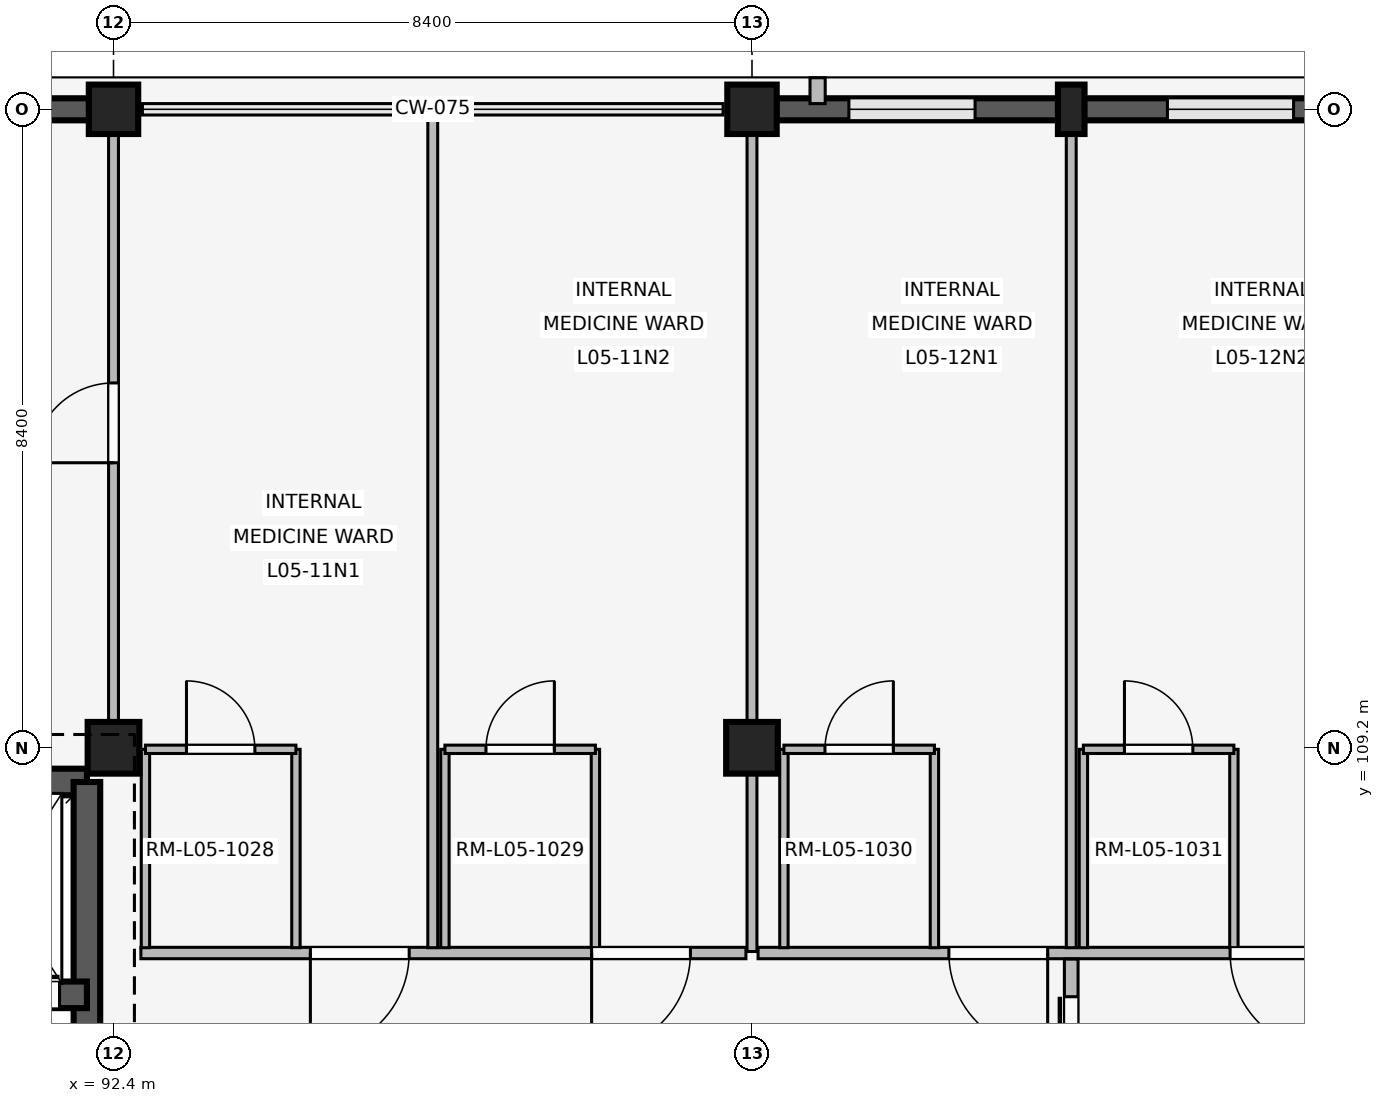
"""IFC4 building model, lengths in metres.
Left out: names, types, materials, properties, quantities, classifications, styles, units other than length and angle.
Written with IfcOpenShell. Run it as: python <this file> out.ifc"""

import sys

from ifc_helpers import new_model, si_unit, direction, frame, frame_2d, origin, origin_2d, place, context, subcontext, project, spatial, rectangle, extrude, element, fill, save


model = new_model("IFC4")
c1 = context("Model", 3, precision=1e-05, world=origin(), true_north=direction((0.0, 1.0)))
c2 = subcontext(c1, "Body", "Model", "MODEL_VIEW")
j1 = project(units=[si_unit("LENGTHUNIT", "METRE"), si_unit("PLANEANGLEUNIT", "RADIAN")], contexts=[c1])
p1 = place(None, origin())
s1 = spatial("IfcSite", under=j1, at=p1, CompositionType="ELEMENT")
p2 = place(p1, origin())
s2 = spatial("IfcBuilding", under=s1, at=p2, CompositionType="ELEMENT")
p3 = place(p2, frame((0.0, 0.0, 20.4)))
s3 = spatial("IfcBuildingStorey", under=s2, at=p3, CompositionType="ELEMENT", Elevation=20.4)
p4 = place(p3, frame((92.4, 109.2, 0.0), z_axis=(0.0, 0.0, 1.0), x_axis=(1.0, 0.0, 0.0)))
e1 = element("IfcColumn", 1, at=p4, inside=s3, PredefinedType="COLUMN", context=c2, shape_type="SweptSolid", body=[
    extrude(rectangle(XDim=0.68, YDim=0.68, at=origin_2d()), origin(), (0.0, 0.0, 1.0), 4.2),
])
p5 = place(p3, frame((92.4, 117.6, 0.0), z_axis=(0.0, 0.0, 1.0), x_axis=(1.0, 0.0, 0.0)))
e2 = element("IfcColumn", 2, at=p5, inside=s3, PredefinedType="COLUMN", context=c2, shape_type="SweptSolid", body=[
    extrude(rectangle(XDim=0.65, YDim=0.65, at=origin_2d()), origin(), (0.0, 0.0, 1.0), 4.2),
])
p6 = place(p3, frame((100.8, 109.2, 0.0), z_axis=(0.0, 0.0, 1.0), x_axis=(1.0, 0.0, 0.0)))
e3 = element("IfcColumn", 3, at=p6, inside=s3, PredefinedType="COLUMN", context=c2, shape_type="SweptSolid", body=[
    extrude(rectangle(XDim=0.68, YDim=0.68, at=origin_2d()), origin(), (0.0, 0.0, 1.0), 4.2),
])
p7 = place(p3, frame((100.8, 117.6, 0.0), z_axis=(0.0, 0.0, 1.0), x_axis=(1.0, 0.0, 0.0)))
e4 = element("IfcColumn", 4, at=p7, inside=s3, PredefinedType="COLUMN", context=c2, shape_type="SweptSolid", body=[
    extrude(rectangle(XDim=0.65, YDim=0.65, at=origin_2d()), origin(), (0.0, 0.0, 1.0), 4.2),
])
p8 = place(p3, frame((105.0, 117.6, 0.0), z_axis=(0.0, 0.0, 1.0), x_axis=(1.0, 0.0, 0.0)))
e5 = element("IfcColumn", 5, at=p8, inside=s3, PredefinedType="PILASTER", context=c2, shape_type="SweptSolid", body=[
    extrude(rectangle(XDim=0.35, YDim=0.65, at=origin_2d()), origin(), (0.0, 0.0, 1.0), 4.2),
])
p9 = place(p3, frame((84.32, 117.6, 0.0), z_axis=(0.0, 0.0, 1.0), x_axis=(1.0, 0.0, 0.0)))
e6 = element("IfcWall", 6, at=p9, inside=s3, PredefinedType="SOLIDWALL", context=c2, shape_type="SweptSolid", body=[
    extrude(rectangle(XDim=7.76, YDim=0.29, at=frame_2d((3.88, 0.0))), origin(), (0.0, 0.0, 1.0), 3.34),
])
p10 = place(p9, frame((1.045, 0.0, 0.85)))
e7 = element("IfcOpeningElement", 7, at=p10, cuts=e6, PredefinedType="OPENING", context=c2, shape_type="SweptSolid", body=[
    extrude(rectangle(XDim=1.48, YDim=1.6, at=frame_2d((0.74, 0.8))), frame((0.0, 0.155, 0.0), z_axis=(0.0, -1.0, 0.0), x_axis=(1.0, 0.0, 0.0)), (0.0, 0.0, 1.0), 0.31),
])
p11 = place(p9, frame((5.235, 0.0, 0.85)))
e8 = element("IfcOpeningElement", 8, at=p11, cuts=e6, PredefinedType="OPENING", context=c2, shape_type="SweptSolid", body=[
    extrude(rectangle(XDim=1.48, YDim=1.6, at=frame_2d((0.74, 0.8))), frame((0.0, 0.155, 0.0), z_axis=(0.0, -1.0, 0.0), x_axis=(1.0, 0.0, 0.0)), (0.0, 0.0, 1.0), 0.31),
])
p12 = place(p3, frame((101.12, 117.6, 0.0), z_axis=(0.0, 0.0, 1.0), x_axis=(1.0, 0.0, 0.0)))
e9 = element("IfcWall", 9, at=p12, inside=s3, PredefinedType="SOLIDWALL", context=c2, shape_type="SweptSolid", body=[
    extrude(rectangle(XDim=7.76, YDim=0.29, at=frame_2d((3.88, 0.0))), origin(), (0.0, 0.0, 1.0), 3.34),
])
p13 = place(p12, frame((0.955, 0.0, 0.85)))
e10 = element("IfcOpeningElement", 10, at=p13, cuts=e9, PredefinedType="OPENING", context=c2, shape_type="SweptSolid", body=[
    extrude(rectangle(XDim=1.66, YDim=1.95, at=frame_2d((0.83, 0.975))), frame((0.0, 0.155, 0.0), z_axis=(0.0, -1.0, 0.0), x_axis=(1.0, 0.0, 0.0)), (0.0, 0.0, 1.0), 0.31),
])
p14 = place(p12, frame((5.145, 0.0, 0.85)))
e11 = element("IfcOpeningElement", 11, at=p14, cuts=e9, PredefinedType="OPENING", context=c2, shape_type="SweptSolid", body=[
    extrude(rectangle(XDim=1.66, YDim=1.95, at=frame_2d((0.83, 0.975))), frame((0.0, 0.155, 0.0), z_axis=(0.0, -1.0, 0.0), x_axis=(1.0, 0.0, 0.0)), (0.0, 0.0, 1.0), 0.31),
])
p15 = place(p3, frame((101.663, 117.675, 0.0), z_axis=(0.0, 0.0, 1.0), x_axis=(0.0, 1.0, 0.0)))
e12 = element("IfcWall", 12, at=p15, inside=s3, PredefinedType="ELEMENTEDWALL", context=c2, shape_type="SweptSolid", body=[
    extrude(rectangle(XDim=0.34, YDim=0.2, at=frame_2d((0.17, 0.0))), origin(), (0.0, 0.0, 1.0), 3.32),
])
p16 = place(p3, frame((84.55, 108.75, 0.0), z_axis=(0.0, 0.0, 1.0), x_axis=(1.0, 0.0, 0.0)))
e13 = element("IfcWall", 13, at=p16, inside=s3, PredefinedType="SHEAR", context=c2, shape_type="SweptSolid", body=[
    extrude(rectangle(XDim=7.5, YDim=0.35, at=frame_2d((3.75, 0.0))), origin(), (0.0, 0.0, 1.0), 3.92),
])
p17 = place(p3, frame((92.05, 101.2, 0.0), z_axis=(0.0, 0.0, 1.0), x_axis=(0.0, 1.0, 0.0)))
e14 = element("IfcWall", 14, at=p17, inside=s3, PredefinedType="SHEAR", context=c2, shape_type="SweptSolid", body=[
    extrude(rectangle(XDim=7.55, YDim=0.35, at=frame_2d((3.775, 0.0))), origin(), (0.0, 0.0, 1.0), 3.92),
])
p18 = place(p17, frame((2.4, 0.0, 0.0)))
e15 = element("IfcOpeningElement", 15, at=p18, cuts=e14, PredefinedType="OPENING", context=c2, shape_type="SweptSolid", body=[
    extrude(rectangle(XDim=1.2, YDim=2.2, at=frame_2d((0.6, 1.1))), frame((0.0, 0.185, 0.0), z_axis=(0.0, -1.0, 0.0), x_axis=(1.0, 0.0, 0.0)), (0.0, 0.0, 1.0), 0.37),
])
p19 = place(p3, frame((88.25, 105.95, 0.0), z_axis=(0.0, 0.0, 1.0), x_axis=(1.0, 0.0, 0.0)))
e16 = element("IfcWall", 16, at=p19, inside=s3, PredefinedType="SHEAR", context=c2, shape_type="SweptSolid", body=[
    extrude(rectangle(XDim=3.8, YDim=0.35, at=frame_2d((1.9, 0.0))), origin(), (0.0, 0.0, 1.0), 3.92),
])
p20 = place(p19, frame((0.32, 0.0, 0.0)))
e17 = element("IfcOpeningElement", 17, at=p20, cuts=e16, PredefinedType="OPENING", context=c2, shape_type="SweptSolid", body=[
    extrude(rectangle(XDim=1.35, YDim=2.25, at=frame_2d((0.675, 1.125))), frame((0.0, 0.185, 0.0), z_axis=(0.0, -1.0, 0.0), x_axis=(1.0, 0.0, 0.0)), (0.0, 0.0, 1.0), 0.37),
])
p21 = place(p19, frame((2.04, 0.0, 0.0)))
e18 = element("IfcOpeningElement", 18, at=p21, cuts=e16, PredefinedType="OPENING", context=c2, shape_type="SweptSolid", body=[
    extrude(rectangle(XDim=1.4, YDim=2.25, at=frame_2d((0.7, 1.125))), frame((0.0, 0.185, 0.0), z_axis=(0.0, -1.0, 0.0), x_axis=(1.0, 0.0, 0.0)), (0.0, 0.0, 1.0), 0.37),
])
p22 = place(p3, frame((92.4, 109.55, 0.0), z_axis=(0.0, 0.0, 1.0), x_axis=(0.0, 1.0, 0.0)))
e19 = element("IfcWall", 19, at=p22, inside=s3, PredefinedType="PARTITIONING", context=c2, shape_type="SweptSolid", body=[
    extrude(rectangle(XDim=7.91, YDim=0.13, at=frame_2d((3.955, 0.0))), origin(), (0.0, 0.0, 1.0), 3.32),
])
p23 = place(p22, frame((3.4, 0.0, 0.0)))
e20 = element("IfcOpeningElement", 20, at=p23, cuts=e19, PredefinedType="OPENING", context=c2, shape_type="SweptSolid", body=[
    extrude(rectangle(XDim=1.05, YDim=2.2, at=frame_2d((0.525, 1.1))), frame((0.0, 0.075, 0.0), z_axis=(0.0, -1.0, 0.0), x_axis=(1.0, 0.0, 0.0)), (0.0, 0.0, 1.0), 0.15),
])
p24 = place(p3, frame((100.72, 106.5, 0.0), z_axis=(0.0, 0.0, 1.0), x_axis=(-1.0, 0.0, 0.0)))
e21 = element("IfcWall", 21, at=p24, inside=s3, PredefinedType="PARTITIONING", context=c2, shape_type="SweptSolid", body=[
    extrude(rectangle(XDim=7.96, YDim=0.15, at=frame_2d((3.98, 0.0))), origin(), (0.0, 0.0, 1.0), 3.32),
])
p25 = place(p24, frame((0.73, 0.0, 0.0)))
e22 = element("IfcOpeningElement", 22, at=p25, cuts=e21, PredefinedType="OPENING", context=c2, shape_type="SweptSolid", body=[
    extrude(rectangle(XDim=1.3, YDim=2.25, at=frame_2d((0.65, 1.125))), frame((0.0, 0.085, 0.0), z_axis=(0.0, -1.0, 0.0), x_axis=(1.0, 0.0, 0.0)), (0.0, 0.0, 1.0), 0.17),
])
p26 = place(p24, frame((4.43, 0.0, 0.0)))
e23 = element("IfcOpeningElement", 23, at=p26, cuts=e21, PredefinedType="OPENING", context=c2, shape_type="SweptSolid", body=[
    extrude(rectangle(XDim=1.3, YDim=2.25, at=frame_2d((0.65, 1.125))), frame((0.0, 0.085, 0.0), z_axis=(0.0, -1.0, 0.0), x_axis=(1.0, 0.0, 0.0)), (0.0, 0.0, 1.0), 0.17),
])
p27 = place(p3, frame((96.6, 106.57, 0.0), z_axis=(0.0, 0.0, 1.0), x_axis=(0.0, 1.0, 0.0)))
e24 = element("IfcWall", 24, at=p27, inside=s3, PredefinedType="PARTITIONING", context=c2, shape_type="SweptSolid", body=[
    extrude(rectangle(XDim=10.93, YDim=0.13, at=frame_2d((5.465, 0.0))), origin(), (0.0, 0.0, 1.0), 3.32),
])
for number, where, z_axis, x_axis in (
    (25, (92.82, 106.57, 0.0), (0.0, 0.0, 1.0), (0.0, 1.0, 0.0)),
    (26, (94.8, 106.57, 0.0), (0.0, 0.0, 1.0), (0.0, 1.0, 0.0)),
):
    element("IfcWall", number, at=place(p3, frame(where, z_axis=z_axis, x_axis=x_axis)), inside=s3, PredefinedType="PARTITIONING", context=c2, shape_type="SweptSolid", body=[
        extrude(rectangle(XDim=2.61, YDim=0.11, at=frame_2d((1.305, 0.0))), origin(), (0.0, 0.0, 1.0), 3.32),
    ])
p28 = place(p3, frame((92.82, 109.18, 0.0), z_axis=(0.0, 0.0, 1.0), x_axis=(1.0, 0.0, 0.0)))
e27 = element("IfcWall", 27, at=p28, inside=s3, PredefinedType="PARTITIONING", context=c2, shape_type="SweptSolid", body=[
    extrude(rectangle(XDim=1.98, YDim=0.11, at=frame_2d((0.99, 0.0))), origin(), (0.0, 0.0, 1.0), 3.32),
])
p29 = place(p28, frame((0.54, 0.0, 0.0)))
e28 = element("IfcOpeningElement", 28, at=p29, cuts=e27, PredefinedType="OPENING", context=c2, shape_type="SweptSolid", body=[
    extrude(rectangle(XDim=0.9, YDim=2.1, at=frame_2d((0.45, 1.05))), frame((0.0, 0.065, 0.0), z_axis=(0.0, -1.0, 0.0), x_axis=(1.0, 0.0, 0.0)), (0.0, 0.0, 1.0), 0.13),
])
for number, where, z_axis, x_axis in (
    (29, (96.76, 106.57, 0.0), (0.0, 0.0, 1.0), (0.0, 1.0, 0.0)),
    (30, (98.74, 106.57, 0.0), (0.0, 0.0, 1.0), (0.0, 1.0, 0.0)),
):
    element("IfcWall", number, at=place(p3, frame(where, z_axis=z_axis, x_axis=x_axis)), inside=s3, PredefinedType="PARTITIONING", context=c2, shape_type="SweptSolid", body=[
        extrude(rectangle(XDim=2.61, YDim=0.11, at=frame_2d((1.305, 0.0))), origin(), (0.0, 0.0, 1.0), 3.32),
    ])
p30 = place(p3, frame((96.76, 109.18, 0.0), z_axis=(0.0, 0.0, 1.0), x_axis=(1.0, 0.0, 0.0)))
e31 = element("IfcWall", 31, at=p30, inside=s3, PredefinedType="PARTITIONING", context=c2, shape_type="SweptSolid", body=[
    extrude(rectangle(XDim=1.98, YDim=0.11, at=frame_2d((0.99, 0.0))), origin(), (0.0, 0.0, 1.0), 3.32),
])
p31 = place(p30, frame((0.54, 0.0, 0.0)))
e32 = element("IfcOpeningElement", 32, at=p31, cuts=e31, PredefinedType="OPENING", context=c2, shape_type="SweptSolid", body=[
    extrude(rectangle(XDim=0.9, YDim=2.1, at=frame_2d((0.45, 1.05))), frame((0.0, 0.065, 0.0), z_axis=(0.0, -1.0, 0.0), x_axis=(1.0, 0.0, 0.0)), (0.0, 0.0, 1.0), 0.13),
])
p32 = place(p3, frame((100.8, 106.52, 0.0), z_axis=(0.0, 0.0, 1.0), x_axis=(0.0, 1.0, 0.0)))
e33 = element("IfcWall", 33, at=p32, inside=s3, PredefinedType="PARTITIONING", context=c2, shape_type="SweptSolid", body=[
    extrude(rectangle(XDim=10.94, YDim=0.13, at=frame_2d((5.47, 0.0))), origin(), (0.0, 0.0, 1.0), 3.32),
])
p33 = place(p3, frame((109.12, 106.5, 0.0), z_axis=(0.0, 0.0, 1.0), x_axis=(-1.0, 0.0, 0.0)))
e34 = element("IfcWall", 34, at=p33, inside=s3, PredefinedType="PARTITIONING", context=c2, shape_type="SweptSolid", body=[
    extrude(rectangle(XDim=8.24, YDim=0.15, at=frame_2d((4.12, 0.0))), origin(), (0.0, 0.0, 1.0), 3.32),
])
p34 = place(p33, frame((0.73, 0.0, 0.0)))
e35 = element("IfcOpeningElement", 35, at=p34, cuts=e34, PredefinedType="OPENING", context=c2, shape_type="SweptSolid", body=[
    extrude(rectangle(XDim=1.3, YDim=2.25, at=frame_2d((0.65, 1.125))), frame((0.0, 0.085, 0.0), z_axis=(0.0, -1.0, 0.0), x_axis=(1.0, 0.0, 0.0)), (0.0, 0.0, 1.0), 0.17),
])
p35 = place(p33, frame((4.43, 0.0, 0.0)))
e36 = element("IfcOpeningElement", 36, at=p35, cuts=e34, PredefinedType="OPENING", context=c2, shape_type="SweptSolid", body=[
    extrude(rectangle(XDim=1.3, YDim=2.25, at=frame_2d((0.65, 1.125))), frame((0.0, 0.085, 0.0), z_axis=(0.0, -1.0, 0.0), x_axis=(1.0, 0.0, 0.0)), (0.0, 0.0, 1.0), 0.17),
])
p36 = place(p3, frame((105.0, 106.57, 0.0), z_axis=(0.0, 0.0, 1.0), x_axis=(0.0, 1.0, 0.0)))
e37 = element("IfcWall", 37, at=p36, inside=s3, PredefinedType="PARTITIONING", context=c2, shape_type="SweptSolid", body=[
    extrude(rectangle(XDim=10.93, YDim=0.13, at=frame_2d((5.465, 0.0))), origin(), (0.0, 0.0, 1.0), 3.32),
])
for number, where, z_axis, x_axis in (
    (38, (101.22, 106.57, 0.0), (0.0, 0.0, 1.0), (0.0, 1.0, 0.0)),
    (39, (103.2, 106.57, 0.0), (0.0, 0.0, 1.0), (0.0, 1.0, 0.0)),
):
    element("IfcWall", number, at=place(p3, frame(where, z_axis=z_axis, x_axis=x_axis)), inside=s3, PredefinedType="PARTITIONING", context=c2, shape_type="SweptSolid", body=[
        extrude(rectangle(XDim=2.61, YDim=0.11, at=frame_2d((1.305, 0.0))), origin(), (0.0, 0.0, 1.0), 3.32),
    ])
p37 = place(p3, frame((101.22, 109.18, 0.0), z_axis=(0.0, 0.0, 1.0), x_axis=(1.0, 0.0, 0.0)))
e40 = element("IfcWall", 40, at=p37, inside=s3, PredefinedType="PARTITIONING", context=c2, shape_type="SweptSolid", body=[
    extrude(rectangle(XDim=1.98, YDim=0.11, at=frame_2d((0.99, 0.0))), origin(), (0.0, 0.0, 1.0), 3.32),
])
p38 = place(p37, frame((0.54, 0.0, 0.0)))
e41 = element("IfcOpeningElement", 41, at=p38, cuts=e40, PredefinedType="OPENING", context=c2, shape_type="SweptSolid", body=[
    extrude(rectangle(XDim=0.9, YDim=2.1, at=frame_2d((0.45, 1.05))), frame((0.0, 0.065, 0.0), z_axis=(0.0, -1.0, 0.0), x_axis=(1.0, 0.0, 0.0)), (0.0, 0.0, 1.0), 0.13),
])
for number, where, z_axis, x_axis in (
    (42, (105.16, 106.57, 0.0), (0.0, 0.0, 1.0), (0.0, 1.0, 0.0)),
    (43, (107.14, 106.57, 0.0), (0.0, 0.0, 1.0), (0.0, 1.0, 0.0)),
):
    element("IfcWall", number, at=place(p3, frame(where, z_axis=z_axis, x_axis=x_axis)), inside=s3, PredefinedType="PARTITIONING", context=c2, shape_type="SweptSolid", body=[
        extrude(rectangle(XDim=2.61, YDim=0.11, at=frame_2d((1.305, 0.0))), origin(), (0.0, 0.0, 1.0), 3.32),
    ])
p39 = place(p3, frame((105.16, 109.18, 0.0), z_axis=(0.0, 0.0, 1.0), x_axis=(1.0, 0.0, 0.0)))
e44 = element("IfcWall", 44, at=p39, inside=s3, PredefinedType="PARTITIONING", context=c2, shape_type="SweptSolid", body=[
    extrude(rectangle(XDim=1.98, YDim=0.11, at=frame_2d((0.99, 0.0))), origin(), (0.0, 0.0, 1.0), 3.32),
])
p40 = place(p39, frame((0.54, 0.0, 0.0)))
e45 = element("IfcOpeningElement", 45, at=p40, cuts=e44, PredefinedType="OPENING", context=c2, shape_type="SweptSolid", body=[
    extrude(rectangle(XDim=0.9, YDim=2.1, at=frame_2d((0.45, 1.05))), frame((0.0, 0.065, 0.0), z_axis=(0.0, -1.0, 0.0), x_axis=(1.0, 0.0, 0.0)), (0.0, 0.0, 1.0), 0.13),
])
p41 = place(p3, frame((105.0, 103.58, 0.0), z_axis=(0.0, 0.0, 1.0), x_axis=(0.0, 1.0, 0.0)))
e46 = element("IfcWall", 46, at=p41, inside=s3, PredefinedType="PARTITIONING", context=c2, shape_type="SweptSolid", body=[
    extrude(rectangle(XDim=2.84, YDim=0.18, at=frame_2d((1.42, 0.0))), origin(), (0.0, 0.0, 1.0), 3.32),
])
p42 = place(p41, frame((0.495, 0.0, 0.0)))
e47 = element("IfcOpeningElement", 47, at=p42, cuts=e46, PredefinedType="OPENING", context=c2, shape_type="SweptSolid", body=[
    extrude(rectangle(XDim=1.85, YDim=2.3, at=frame_2d((0.925, 1.15))), frame((0.0, 0.1, 0.0), z_axis=(0.0, -1.0, 0.0), x_axis=(1.0, 0.0, 0.0)), (0.0, 0.0, 1.0), 0.2),
])
p43 = place(p13, origin())
e48 = element("IfcWindow", 48, at=p43, inside=s3, PartitioningType="SINGLE_PANEL", PredefinedType="WINDOW", context=c2, shape_type="SweptSolid", body=[
    extrude(rectangle(XDim=1.66, YDim=1.95, at=frame_2d((0.83, 0.975))), frame((0.0, 0.03, 0.0), z_axis=(0.0, -1.0, 0.0), x_axis=(1.0, 0.0, 0.0)), (0.0, 0.0, 1.0), 0.06),
])
fill(e10, e48)
p44 = place(p14, origin())
e49 = element("IfcWindow", 49, at=p44, inside=s3, PartitioningType="SINGLE_PANEL", PredefinedType="WINDOW", context=c2, shape_type="SweptSolid", body=[
    extrude(rectangle(XDim=1.66, YDim=1.95, at=frame_2d((0.83, 0.975))), frame((0.0, 0.03, 0.0), z_axis=(0.0, -1.0, 0.0), x_axis=(1.0, 0.0, 0.0)), (0.0, 0.0, 1.0), 0.06),
])
fill(e11, e49)
p45 = place(p21, origin())
e50 = element("IfcDoor", 50, at=p45, inside=s3, OperationType="SLIDING_TO_LEFT", PredefinedType="DOOR", context=c2, shape_type="SweptSolid", body=[
    extrude(rectangle(XDim=1.4, YDim=2.25, at=frame_2d((0.7, 1.125))), frame((0.0, 0.025, 0.0), z_axis=(0.0, -1.0, 0.0), x_axis=(1.0, 0.0, 0.0)), (0.0, 0.0, 1.0), 0.05),
])
fill(e18, e50)
p46 = place(p23, origin())
e51 = element("IfcDoor", 51, at=p46, inside=s3, OperationType="SINGLE_SWING_LEFT", PredefinedType="DOOR", context=c2, shape_type="SweptSolid", body=[
    extrude(rectangle(XDim=1.05, YDim=2.2, at=frame_2d((0.525, 1.1))), frame((0.0, 0.025, 0.0), z_axis=(0.0, -1.0, 0.0), x_axis=(1.0, 0.0, 0.0)), (0.0, 0.0, 1.0), 0.05),
])
fill(e20, e51)
p47 = place(p25, origin())
e52 = element("IfcDoor", 52, at=p47, inside=s3, OperationType="SINGLE_SWING_RIGHT", PredefinedType="DOOR", context=c2, shape_type="SweptSolid", body=[
    extrude(rectangle(XDim=1.3, YDim=2.25, at=frame_2d((0.65, 1.125))), frame((0.0, 0.025, 0.0), z_axis=(0.0, -1.0, 0.0), x_axis=(1.0, 0.0, 0.0)), (0.0, 0.0, 1.0), 0.05),
])
fill(e22, e52)
p48 = place(p26, origin())
e53 = element("IfcDoor", 53, at=p48, inside=s3, OperationType="SINGLE_SWING_RIGHT", PredefinedType="DOOR", context=c2, shape_type="SweptSolid", body=[
    extrude(rectangle(XDim=1.3, YDim=2.25, at=frame_2d((0.65, 1.125))), frame((0.0, 0.025, 0.0), z_axis=(0.0, -1.0, 0.0), x_axis=(1.0, 0.0, 0.0)), (0.0, 0.0, 1.0), 0.05),
])
fill(e23, e53)
p49 = place(p29, origin())
e54 = element("IfcDoor", 54, at=p49, inside=s3, OperationType="SINGLE_SWING_LEFT", PredefinedType="DOOR", context=c2, shape_type="SweptSolid", body=[
    extrude(rectangle(XDim=0.9, YDim=2.1, at=frame_2d((0.45, 1.05))), frame((0.0, 0.025, 0.0), z_axis=(0.0, -1.0, 0.0), x_axis=(1.0, 0.0, 0.0)), (0.0, 0.0, 1.0), 0.05),
])
fill(e28, e54)
p50 = place(p31, origin())
e55 = element("IfcDoor", 55, at=p50, inside=s3, OperationType="SINGLE_SWING_RIGHT", PredefinedType="DOOR", context=c2, shape_type="SweptSolid", body=[
    extrude(rectangle(XDim=0.9, YDim=2.1, at=frame_2d((0.45, 1.05))), frame((0.0, 0.025, 0.0), z_axis=(0.0, -1.0, 0.0), x_axis=(1.0, 0.0, 0.0)), (0.0, 0.0, 1.0), 0.05),
])
fill(e32, e55)
p51 = place(p34, origin())
e56 = element("IfcDoor", 56, at=p51, inside=s3, OperationType="SINGLE_SWING_LEFT", PredefinedType="DOOR", context=c2, shape_type="SweptSolid", body=[
    extrude(rectangle(XDim=1.3, YDim=2.25, at=frame_2d((0.65, 1.125))), frame((0.0, 0.025, 0.0), z_axis=(0.0, -1.0, 0.0), x_axis=(1.0, 0.0, 0.0)), (0.0, 0.0, 1.0), 0.05),
])
fill(e35, e56)
p52 = place(p35, origin())
e57 = element("IfcDoor", 57, at=p52, inside=s3, OperationType="SINGLE_SWING_LEFT", PredefinedType="DOOR", context=c2, shape_type="SweptSolid", body=[
    extrude(rectangle(XDim=1.3, YDim=2.25, at=frame_2d((0.65, 1.125))), frame((0.0, 0.025, 0.0), z_axis=(0.0, -1.0, 0.0), x_axis=(1.0, 0.0, 0.0)), (0.0, 0.0, 1.0), 0.05),
])
fill(e36, e57)
p53 = place(p38, origin())
e58 = element("IfcDoor", 58, at=p53, inside=s3, OperationType="SINGLE_SWING_RIGHT", PredefinedType="DOOR", context=c2, shape_type="SweptSolid", body=[
    extrude(rectangle(XDim=0.9, YDim=2.1, at=frame_2d((0.45, 1.05))), frame((0.0, 0.025, 0.0), z_axis=(0.0, -1.0, 0.0), x_axis=(1.0, 0.0, 0.0)), (0.0, 0.0, 1.0), 0.05),
])
fill(e41, e58)
p54 = place(p40, origin())
e59 = element("IfcDoor", 59, at=p54, inside=s3, OperationType="SINGLE_SWING_LEFT", PredefinedType="DOOR", context=c2, shape_type="SweptSolid", body=[
    extrude(rectangle(XDim=0.9, YDim=2.1, at=frame_2d((0.45, 1.05))), frame((0.0, 0.025, 0.0), z_axis=(0.0, -1.0, 0.0), x_axis=(1.0, 0.0, 0.0)), (0.0, 0.0, 1.0), 0.05),
])
fill(e45, e59)
p55 = place(p42, origin())
e60 = element("IfcDoor", 60, at=p55, inside=s3, OperationType="SLIDING_TO_LEFT", PredefinedType="DOOR", context=c2, shape_type="SweptSolid", body=[
    extrude(rectangle(XDim=1.85, YDim=2.3, at=frame_2d((0.925, 1.15))), frame((0.0, 0.025, 0.0), z_axis=(0.0, -1.0, 0.0), x_axis=(1.0, 0.0, 0.0)), (0.0, 0.0, 1.0), 0.05),
])
fill(e47, e60)
save(model, sys.argv[1])
